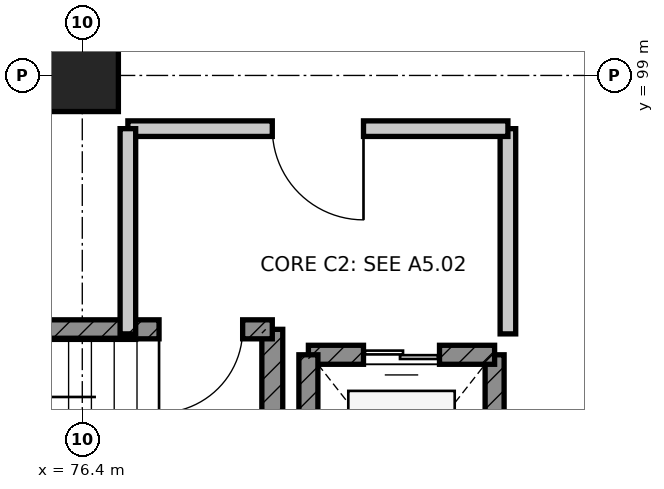
"""IFC4 building model, lengths in metres.
Left out: names, types, materials, properties, quantities, classifications, styles, units other than length and angle.
Written with IfcOpenShell. Run it as: python <this file> out.ifc"""

import sys

from ifc_helpers import new_model, si_unit, direction, frame, frame_2d, origin, origin_2d, place, context, subcontext, project, spatial, rectangle, extrude, element, fill, save


model = new_model("IFC4")
c1 = context("Model", 3, precision=1e-05, world=origin(), true_north=direction((0.0, 1.0)))
c2 = subcontext(c1, "Body", "Model", "MODEL_VIEW")
j1 = project(units=[si_unit("LENGTHUNIT", "METRE"), si_unit("PLANEANGLEUNIT", "RADIAN")], contexts=[c1])
p1 = place(None, origin())
s1 = spatial("IfcSite", under=j1, at=p1, CompositionType="ELEMENT")
p2 = place(p1, origin())
s2 = spatial("IfcBuilding", under=s1, at=p2, CompositionType="ELEMENT")
p3 = place(p2, frame((0.0, 0.0, -4.5)))
s3 = spatial("IfcBuildingStorey", under=s2, at=p3, CompositionType="ELEMENT", Elevation=-4.5)
p4 = place(p3, frame((76.4, 99.0, 0.0), z_axis=(0.0, 0.0, 1.0), x_axis=(1.0, 0.0, 0.0)))
e1 = element("IfcColumn", 1, at=p4, inside=s3, PredefinedType="COLUMN", context=c2, shape_type="SweptSolid", body=[
    extrude(rectangle(XDim=0.95, YDim=0.95, at=origin_2d()), origin(), (0.0, 0.0, 1.0), 4.5),
])
p5 = place(p3, frame((78.9, 92.1, 0.0), z_axis=(0.0, 0.0, 1.0), x_axis=(0.0, 1.0, 0.0)))
e2 = element("IfcWall", 2, at=p5, inside=s3, PredefinedType="SHEAR", context=c2, shape_type="SweptSolid", body=[
    extrude(rectangle(XDim=3.56, YDim=0.275, at=frame_2d((1.78, 0.0))), origin(), (0.0, 0.0, 1.0), 4.2),
])
p6 = place(p3, frame((78.9, 95.66, 0.0), z_axis=(0.0, 0.0, 1.0), x_axis=(-1.0, 0.0, 0.0)))
e3 = element("IfcWall", 3, at=p6, inside=s3, PredefinedType="SHEAR", context=c2, shape_type="SweptSolid", body=[
    extrude(rectangle(XDim=8.4, YDim=0.25, at=frame_2d((4.2, 0.0))), origin(), (0.0, 0.0, 1.0), 4.2),
])
p7 = place(p6, frame((0.39, 0.0, 0.0)))
e4 = element("IfcOpeningElement", 4, at=p7, cuts=e3, PredefinedType="OPENING", context=c2, shape_type="SweptSolid", body=[
    extrude(rectangle(XDim=1.1, YDim=2.1, at=frame_2d((0.55, 1.05))), frame((0.0, 0.135, 0.0), z_axis=(0.0, -1.0, 0.0), x_axis=(1.0, 0.0, 0.0)), (0.0, 0.0, 1.0), 0.27),
])
p8 = place(p3, frame((81.825, 92.275, 0.0), z_axis=(0.0, 0.0, 1.0), x_axis=(0.0, 1.0, 0.0)))
e5 = element("IfcWall", 5, at=p8, inside=s3, PredefinedType="SHEAR", context=c2, shape_type="SweptSolid", body=[
    extrude(rectangle(XDim=3.05, YDim=0.25, at=frame_2d((1.525, 0.0))), origin(), (0.0, 0.0, 1.0), 4.2),
])
p9 = place(p3, frame((81.825, 95.325, 0.0), z_axis=(0.0, 0.0, 1.0), x_axis=(-1.0, 0.0, 0.0)))
e6 = element("IfcWall", 6, at=p9, inside=s3, PredefinedType="SHEAR", context=c2, shape_type="SweptSolid", body=[
    extrude(rectangle(XDim=2.45, YDim=0.25, at=frame_2d((1.225, 0.0))), origin(), (0.0, 0.0, 1.0), 4.2),
])
p10 = place(p9, frame((0.725, 0.0, 0.0)))
e7 = element("IfcOpeningElement", 7, at=p10, cuts=e6, PredefinedType="OPENING", context=c2, shape_type="SweptSolid", body=[
    extrude(rectangle(XDim=1.0, YDim=2.15, at=frame_2d((0.5, 1.075))), frame((0.0, 0.135, 0.0), z_axis=(0.0, -1.0, 0.0), x_axis=(1.0, 0.0, 0.0)), (0.0, 0.0, 1.0), 0.27),
])
p11 = place(p3, frame((79.375, 95.325, 0.0), z_axis=(0.0, 0.0, 1.0), x_axis=(0.0, -1.0, 0.0)))
e8 = element("IfcWall", 8, at=p11, inside=s3, PredefinedType="SHEAR", context=c2, shape_type="SweptSolid", body=[
    extrude(rectangle(XDim=3.05, YDim=0.25, at=frame_2d((1.525, 0.0))), origin(), (0.0, 0.0, 1.0), 4.2),
])
p12 = place(p3, frame((82.0, 95.6, 0.0), z_axis=(0.0, 0.0, 1.0), x_axis=(0.0, 1.0, 0.0)))
e9 = element("IfcWall", 9, at=p12, inside=s3, PredefinedType="PARTITIONING", context=c2, shape_type="SweptSolid", body=[
    extrude(rectangle(XDim=2.7, YDim=0.205, at=frame_2d((1.35, 0.0))), origin(), (0.0, 0.0, 1.0), 4.2),
])
p13 = place(p3, frame((82.0, 98.3, 0.0), z_axis=(0.0, 0.0, 1.0), x_axis=(-1.0, 0.0, 0.0)))
e10 = element("IfcWall", 10, at=p13, inside=s3, PredefinedType="PARTITIONING", context=c2, shape_type="SweptSolid", body=[
    extrude(rectangle(XDim=5.0, YDim=0.205, at=frame_2d((2.5, 0.0))), origin(), (0.0, 0.0, 1.0), 4.2),
])
p14 = place(p13, frame((1.9, 0.0, 0.0)))
e11 = element("IfcOpeningElement", 11, at=p14, cuts=e10, PredefinedType="OPENING", context=c2, shape_type="SweptSolid", body=[
    extrude(rectangle(XDim=1.2, YDim=2.1, at=frame_2d((0.6, 1.05))), frame((0.0, 0.113, 0.0), z_axis=(0.0, -1.0, 0.0), x_axis=(1.0, 0.0, 0.0)), (0.0, 0.0, 1.0), 0.225),
])
p15 = place(p3, frame((77.0, 98.3, 0.0), z_axis=(0.0, 0.0, 1.0), x_axis=(0.0, -1.0, 0.0)))
e12 = element("IfcWall", 12, at=p15, inside=s3, PredefinedType="PARTITIONING", context=c2, shape_type="SweptSolid", body=[
    extrude(rectangle(XDim=2.7, YDim=0.205, at=frame_2d((1.35, 0.0))), origin(), (0.0, 0.0, 1.0), 4.2),
])
p16 = place(p7, origin())
e13 = element("IfcDoor", 13, at=p16, inside=s3, OperationType="SINGLE_SWING_RIGHT", PredefinedType="DOOR", context=c2, shape_type="SweptSolid", body=[
    extrude(rectangle(XDim=1.1, YDim=2.1, at=frame_2d((0.55, 1.05))), frame((0.0, 0.025, 0.0), z_axis=(0.0, -1.0, 0.0), x_axis=(1.0, 0.0, 0.0)), (0.0, 0.0, 1.0), 0.05),
])
fill(e4, e13)
p17 = place(p10, origin())
e14 = element("IfcDoor", 14, at=p17, inside=s3, OperationType="DOUBLE_DOOR_SLIDING", PredefinedType="DOOR", context=c2, shape_type="SweptSolid", body=[
    extrude(rectangle(XDim=1.0, YDim=2.15, at=frame_2d((0.5, 1.075))), frame((0.0, 0.025, 0.0), z_axis=(0.0, -1.0, 0.0), x_axis=(1.0, 0.0, 0.0)), (0.0, 0.0, 1.0), 0.05),
])
fill(e7, e14)
p18 = place(p14, origin())
e15 = element("IfcDoor", 15, at=p18, inside=s3, OperationType="SINGLE_SWING_LEFT", PredefinedType="DOOR", context=c2, shape_type="SweptSolid", body=[
    extrude(rectangle(XDim=1.2, YDim=2.1, at=frame_2d((0.6, 1.05))), frame((0.0, 0.025, 0.0), z_axis=(0.0, -1.0, 0.0), x_axis=(1.0, 0.0, 0.0)), (0.0, 0.0, 1.0), 0.05),
])
fill(e11, e15)
save(model, sys.argv[1])
